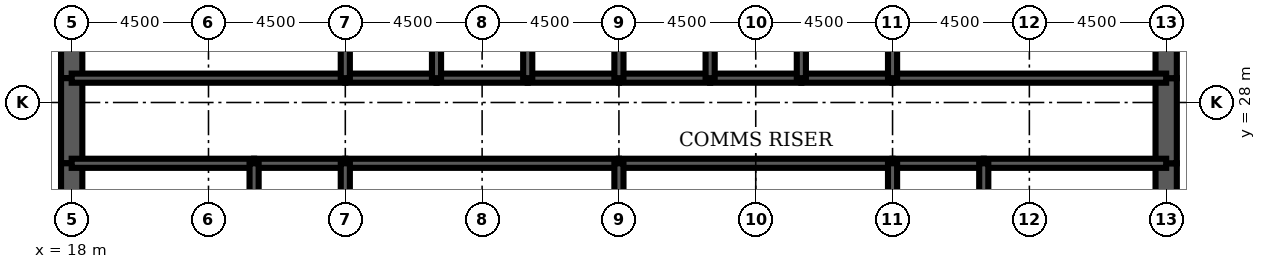
"""IFC4 building model, lengths in metres.
Left out: names, types, materials, properties, quantities, classifications, styles, units other than length and angle.
Written with IfcOpenShell. Run it as: python <this file> out.ifc"""

import sys

from ifc_helpers import new_model, si_unit, direction, frame, frame_2d, origin, place, context, subcontext, project, spatial, rectangle, extrude, element, fill, save


model = new_model("IFC4")
c1 = context("Model", 3, precision=1e-05, world=origin(), true_north=direction((0.0, 1.0)))
c2 = subcontext(c1, "Body", "Model", "MODEL_VIEW")
j1 = project(units=[si_unit("LENGTHUNIT", "METRE"), si_unit("PLANEANGLEUNIT", "RADIAN")], contexts=[c1])
p1 = place(None, origin())
s1 = spatial("IfcSite", under=j1, at=p1, CompositionType="ELEMENT")
p2 = place(p1, origin())
s2 = spatial("IfcBuilding", under=s1, at=p2, CompositionType="ELEMENT")
p3 = place(p2, frame((0.0, 0.0, 292.1)))
s3 = spatial("IfcBuildingStorey", under=s2, at=p3, CompositionType="ELEMENT", Elevation=292.1)
p4 = place(p3, frame((18.0, 32.0, 0.0), z_axis=(0.0, 0.0, 1.0), x_axis=(0.0, -1.0, 0.0)))
e1 = element("IfcWall", 1, at=p4, inside=s3, PredefinedType="SHEAR", context=c2, shape_type="SweptSolid", body=[
    extrude(rectangle(XDim=3.2, YDim=0.7, at=frame_2d((1.6, 0.0))), origin(), (0.0, 0.0, 1.0), 4.2),
])
p5 = place(p3, frame((18.0, 28.8, 0.0), z_axis=(0.0, 0.0, 1.0), x_axis=(0.0, -1.0, 0.0)))
e2 = element("IfcWall", 2, at=p5, inside=s3, PredefinedType="SHEAR", context=c2, shape_type="SweptSolid", body=[
    extrude(rectangle(XDim=2.8, YDim=0.7, at=frame_2d((1.4, 0.0))), origin(), (0.0, 0.0, 1.0), 4.2),
])
p6 = place(p5, frame((0.4, 0.0, 0.0)))
e3 = element("IfcOpeningElement", 3, at=p6, cuts=e2, PredefinedType="OPENING", context=c2, shape_type="SweptSolid", body=[
    extrude(rectangle(XDim=1.8, YDim=2.1, at=frame_2d((0.9, 1.05))), frame((0.0, 0.36, 0.0), z_axis=(0.0, -1.0, 0.0), x_axis=(1.0, 0.0, 0.0)), (0.0, 0.0, 1.0), 0.72),
])
for number, where, z_axis, x_axis in (
    (4, (18.0, 26.0, 0.0), (0.0, 0.0, 1.0), (0.0, -1.0, 0.0)),
    (5, (54.0, 22.0, 0.0), (0.0, 0.0, 1.0), (0.0, 1.0, 0.0)),
):
    element("IfcWall", number, at=place(p3, frame(where, z_axis=z_axis, x_axis=x_axis)), inside=s3, PredefinedType="SHEAR", context=c2, shape_type="SweptSolid", body=[
        extrude(rectangle(XDim=4.0, YDim=0.7, at=frame_2d((2.0, 0.0))), origin(), (0.0, 0.0, 1.0), 4.2),
    ])
p7 = place(p3, frame((54.0, 26.0, 0.0), z_axis=(0.0, 0.0, 1.0), x_axis=(0.0, 1.0, 0.0)))
e6 = element("IfcWall", 6, at=p7, inside=s3, PredefinedType="SHEAR", context=c2, shape_type="SweptSolid", body=[
    extrude(rectangle(XDim=2.8, YDim=0.7, at=frame_2d((1.4, 0.0))), origin(), (0.0, 0.0, 1.0), 4.2),
])
p8 = place(p7, frame((0.6, 0.0, 0.0)))
e7 = element("IfcOpeningElement", 7, at=p8, cuts=e6, PredefinedType="OPENING", context=c2, shape_type="SweptSolid", body=[
    extrude(rectangle(XDim=1.8, YDim=2.1, at=frame_2d((0.9, 1.05))), frame((0.0, 0.36, 0.0), z_axis=(0.0, -1.0, 0.0), x_axis=(1.0, 0.0, 0.0)), (0.0, 0.0, 1.0), 0.72),
])
p9 = place(p3, frame((54.0, 28.8, 0.0), z_axis=(0.0, 0.0, 1.0), x_axis=(0.0, 1.0, 0.0)))
e8 = element("IfcWall", 8, at=p9, inside=s3, PredefinedType="SHEAR", context=c2, shape_type="SweptSolid", body=[
    extrude(rectangle(XDim=3.2, YDim=0.7, at=frame_2d((1.6, 0.0))), origin(), (0.0, 0.0, 1.0), 4.2),
])
p10 = place(p3, frame((18.0, 28.8, 0.0), z_axis=(0.0, 0.0, 1.0), x_axis=(1.0, 0.0, 0.0)))
e9 = element("IfcWall", 9, at=p10, inside=s3, PredefinedType="SOLIDWALL", context=c2, shape_type="SweptSolid", body=[
    extrude(rectangle(XDim=9.0, YDim=0.3, at=frame_2d((4.5, 0.0))), origin(), (0.0, 0.0, 1.0), 4.2),
])
p11 = place(p10, frame((0.65, 0.0, 0.0)))
e10 = element("IfcOpeningElement", 10, at=p11, cuts=e9, PredefinedType="OPENING", context=c2, shape_type="SweptSolid", body=[
    extrude(rectangle(XDim=1.0, YDim=2.1, at=frame_2d((0.5, 1.05))), frame((0.0, 0.16, 0.0), z_axis=(0.0, -1.0, 0.0), x_axis=(1.0, 0.0, 0.0)), (0.0, 0.0, 1.0), 0.32),
])
p12 = place(p3, frame((27.0, 28.8, 0.0), z_axis=(0.0, 0.0, 1.0), x_axis=(1.0, 0.0, 0.0)))
e11 = element("IfcWall", 11, at=p12, inside=s3, PredefinedType="SOLIDWALL", context=c2, shape_type="SweptSolid", body=[
    extrude(rectangle(XDim=3.0, YDim=0.3, at=frame_2d((1.5, 0.0))), origin(), (0.0, 0.0, 1.0), 4.2),
])
p13 = place(p12, frame((0.95, 0.0, 0.0)))
e12 = element("IfcOpeningElement", 12, at=p13, cuts=e11, PredefinedType="OPENING", context=c2, shape_type="SweptSolid", body=[
    extrude(rectangle(XDim=1.1, YDim=2.2, at=frame_2d((0.55, 1.1))), frame((0.0, 0.16, 0.0), z_axis=(0.0, -1.0, 0.0), x_axis=(1.0, 0.0, 0.0)), (0.0, 0.0, 1.0), 0.32),
])
p14 = place(p3, frame((30.0, 28.8, 0.0), z_axis=(0.0, 0.0, 1.0), x_axis=(1.0, 0.0, 0.0)))
e13 = element("IfcWall", 13, at=p14, inside=s3, PredefinedType="SOLIDWALL", context=c2, shape_type="SweptSolid", body=[
    extrude(rectangle(XDim=3.0, YDim=0.3, at=frame_2d((1.5, 0.0))), origin(), (0.0, 0.0, 1.0), 4.2),
])
p15 = place(p14, frame((0.95, 0.0, 0.0)))
e14 = element("IfcOpeningElement", 14, at=p15, cuts=e13, PredefinedType="OPENING", context=c2, shape_type="SweptSolid", body=[
    extrude(rectangle(XDim=1.1, YDim=2.2, at=frame_2d((0.55, 1.1))), frame((0.0, 0.16, 0.0), z_axis=(0.0, -1.0, 0.0), x_axis=(1.0, 0.0, 0.0)), (0.0, 0.0, 1.0), 0.32),
])
p16 = place(p3, frame((33.0, 28.8, 0.0), z_axis=(0.0, 0.0, 1.0), x_axis=(1.0, 0.0, 0.0)))
e15 = element("IfcWall", 15, at=p16, inside=s3, PredefinedType="SOLIDWALL", context=c2, shape_type="SweptSolid", body=[
    extrude(rectangle(XDim=3.0, YDim=0.3, at=frame_2d((1.5, 0.0))), origin(), (0.0, 0.0, 1.0), 4.2),
])
p17 = place(p16, frame((0.95, 0.0, 0.0)))
e16 = element("IfcOpeningElement", 16, at=p17, cuts=e15, PredefinedType="OPENING", context=c2, shape_type="SweptSolid", body=[
    extrude(rectangle(XDim=1.1, YDim=2.2, at=frame_2d((0.55, 1.1))), frame((0.0, 0.16, 0.0), z_axis=(0.0, -1.0, 0.0), x_axis=(1.0, 0.0, 0.0)), (0.0, 0.0, 1.0), 0.32),
])
p18 = place(p3, frame((36.0, 28.8, 0.0), z_axis=(0.0, 0.0, 1.0), x_axis=(1.0, 0.0, 0.0)))
e17 = element("IfcWall", 17, at=p18, inside=s3, PredefinedType="SOLIDWALL", context=c2, shape_type="SweptSolid", body=[
    extrude(rectangle(XDim=3.0, YDim=0.3, at=frame_2d((1.5, 0.0))), origin(), (0.0, 0.0, 1.0), 4.2),
])
p19 = place(p18, frame((1.0, 0.0, 0.0)))
e18 = element("IfcOpeningElement", 18, at=p19, cuts=e17, PredefinedType="OPENING", context=c2, shape_type="SweptSolid", body=[
    extrude(rectangle(XDim=1.0, YDim=2.1, at=frame_2d((0.5, 1.05))), frame((0.0, 0.16, 0.0), z_axis=(0.0, -1.0, 0.0), x_axis=(1.0, 0.0, 0.0)), (0.0, 0.0, 1.0), 0.32),
])
p20 = place(p3, frame((39.0, 28.8, 0.0), z_axis=(0.0, 0.0, 1.0), x_axis=(1.0, 0.0, 0.0)))
e19 = element("IfcWall", 19, at=p20, inside=s3, PredefinedType="SOLIDWALL", context=c2, shape_type="SweptSolid", body=[
    extrude(rectangle(XDim=3.0, YDim=0.3, at=frame_2d((1.5, 0.0))), origin(), (0.0, 0.0, 1.0), 4.2),
])
p21 = place(p20, frame((1.0, 0.0, 0.0)))
e20 = element("IfcOpeningElement", 20, at=p21, cuts=e19, PredefinedType="OPENING", context=c2, shape_type="SweptSolid", body=[
    extrude(rectangle(XDim=1.0, YDim=2.1, at=frame_2d((0.5, 1.05))), frame((0.0, 0.16, 0.0), z_axis=(0.0, -1.0, 0.0), x_axis=(1.0, 0.0, 0.0)), (0.0, 0.0, 1.0), 0.32),
])
p22 = place(p3, frame((42.0, 28.8, 0.0), z_axis=(0.0, 0.0, 1.0), x_axis=(1.0, 0.0, 0.0)))
e21 = element("IfcWall", 21, at=p22, inside=s3, PredefinedType="SOLIDWALL", context=c2, shape_type="SweptSolid", body=[
    extrude(rectangle(XDim=3.0, YDim=0.3, at=frame_2d((1.5, 0.0))), origin(), (0.0, 0.0, 1.0), 4.2),
])
p23 = place(p22, frame((0.95, 0.0, 0.0)))
e22 = element("IfcOpeningElement", 22, at=p23, cuts=e21, PredefinedType="OPENING", context=c2, shape_type="SweptSolid", body=[
    extrude(rectangle(XDim=1.1, YDim=2.2, at=frame_2d((0.55, 1.1))), frame((0.0, 0.16, 0.0), z_axis=(0.0, -1.0, 0.0), x_axis=(1.0, 0.0, 0.0)), (0.0, 0.0, 1.0), 0.32),
])
p24 = place(p3, frame((45.0, 28.8, 0.0), z_axis=(0.0, 0.0, 1.0), x_axis=(1.0, 0.0, 0.0)))
e23 = element("IfcWall", 23, at=p24, inside=s3, PredefinedType="SOLIDWALL", context=c2, shape_type="SweptSolid", body=[
    extrude(rectangle(XDim=9.0, YDim=0.3, at=frame_2d((4.5, 0.0))), origin(), (0.0, 0.0, 1.0), 4.2),
])
p25 = place(p24, frame((7.35, 0.0, 0.0)))
e24 = element("IfcOpeningElement", 24, at=p25, cuts=e23, PredefinedType="OPENING", context=c2, shape_type="SweptSolid", body=[
    extrude(rectangle(XDim=1.0, YDim=2.1, at=frame_2d((0.5, 1.05))), frame((0.0, 0.16, 0.0), z_axis=(0.0, -1.0, 0.0), x_axis=(1.0, 0.0, 0.0)), (0.0, 0.0, 1.0), 0.32),
])
p26 = place(p3, frame((18.0, 26.0, 0.0), z_axis=(0.0, 0.0, 1.0), x_axis=(1.0, 0.0, 0.0)))
e25 = element("IfcWall", 25, at=p26, inside=s3, PredefinedType="SOLIDWALL", context=c2, shape_type="SweptSolid", body=[
    extrude(rectangle(XDim=6.0, YDim=0.3, at=frame_2d((3.0, 0.0))), origin(), (0.0, 0.0, 1.0), 4.2),
])
p27 = place(p3, frame((24.0, 26.0, 0.0), z_axis=(0.0, 0.0, 1.0), x_axis=(1.0, 0.0, 0.0)))
e26 = element("IfcWall", 26, at=p27, inside=s3, PredefinedType="SOLIDWALL", context=c2, shape_type="SweptSolid", body=[
    extrude(rectangle(XDim=3.0, YDim=0.3, at=frame_2d((1.5, 0.0))), origin(), (0.0, 0.0, 1.0), 4.2),
])
for number, where, z_axis, x_axis in (
    (27, (27.0, 26.0, 0.0), (0.0, 0.0, 1.0), (1.0, 0.0, 0.0)),
    (28, (36.0, 26.0, 0.0), (0.0, 0.0, 1.0), (1.0, 0.0, 0.0)),
):
    element("IfcWall", number, at=place(p3, frame(where, z_axis=z_axis, x_axis=x_axis)), inside=s3, PredefinedType="SOLIDWALL", context=c2, shape_type="SweptSolid", body=[
        extrude(rectangle(XDim=9.0, YDim=0.3, at=frame_2d((4.5, 0.0))), origin(), (0.0, 0.0, 1.0), 4.2),
    ])
p28 = place(p3, frame((45.0, 26.0, 0.0), z_axis=(0.0, 0.0, 1.0), x_axis=(1.0, 0.0, 0.0)))
e29 = element("IfcWall", 29, at=p28, inside=s3, PredefinedType="SOLIDWALL", context=c2, shape_type="SweptSolid", body=[
    extrude(rectangle(XDim=3.0, YDim=0.3, at=frame_2d((1.5, 0.0))), origin(), (0.0, 0.0, 1.0), 4.2),
])
p29 = place(p3, frame((48.0, 26.0, 0.0), z_axis=(0.0, 0.0, 1.0), x_axis=(1.0, 0.0, 0.0)))
e30 = element("IfcWall", 30, at=p29, inside=s3, PredefinedType="SOLIDWALL", context=c2, shape_type="SweptSolid", body=[
    extrude(rectangle(XDim=6.0, YDim=0.3, at=frame_2d((3.0, 0.0))), origin(), (0.0, 0.0, 1.0), 4.2),
])
for number, where, z_axis, x_axis in (
    (31, (27.0, 28.8, 0.0), (0.0, 0.0, 1.0), (0.0, 1.0, 0.0)),
    (32, (30.0, 28.8, 0.0), (0.0, 0.0, 1.0), (0.0, 1.0, 0.0)),
    (33, (33.0, 28.8, 0.0), (0.0, 0.0, 1.0), (0.0, 1.0, 0.0)),
    (34, (36.0, 28.8, 0.0), (0.0, 0.0, 1.0), (0.0, 1.0, 0.0)),
    (35, (39.0, 28.8, 0.0), (0.0, 0.0, 1.0), (0.0, 1.0, 0.0)),
    (36, (42.0, 28.8, 0.0), (0.0, 0.0, 1.0), (0.0, 1.0, 0.0)),
    (37, (45.0, 28.8, 0.0), (0.0, 0.0, 1.0), (0.0, 1.0, 0.0)),
):
    element("IfcWall", number, at=place(p3, frame(where, z_axis=z_axis, x_axis=x_axis)), inside=s3, PredefinedType="SOLIDWALL", context=c2, shape_type="SweptSolid", body=[
        extrude(rectangle(XDim=3.2, YDim=0.3, at=frame_2d((1.6, 0.0))), origin(), (0.0, 0.0, 1.0), 4.2),
    ])
for number, where, z_axis, x_axis in (
    (38, (24.0, 22.0, 0.0), (0.0, 0.0, 1.0), (0.0, 1.0, 0.0)),
    (39, (27.0, 22.0, 0.0), (0.0, 0.0, 1.0), (0.0, 1.0, 0.0)),
    (40, (36.0, 22.0, 0.0), (0.0, 0.0, 1.0), (0.0, 1.0, 0.0)),
    (41, (45.0, 22.0, 0.0), (0.0, 0.0, 1.0), (0.0, 1.0, 0.0)),
    (42, (48.0, 22.0, 0.0), (0.0, 0.0, 1.0), (0.0, 1.0, 0.0)),
):
    element("IfcWall", number, at=place(p3, frame(where, z_axis=z_axis, x_axis=x_axis)), inside=s3, PredefinedType="SOLIDWALL", context=c2, shape_type="SweptSolid", body=[
        extrude(rectangle(XDim=4.0, YDim=0.3, at=frame_2d((2.0, 0.0))), origin(), (0.0, 0.0, 1.0), 4.2),
    ])
p30 = place(p3, frame((39.0, 22.15, 0.0), z_axis=(0.0, 0.0, 1.0), x_axis=(0.0, 1.0, 0.0)))
e43 = element("IfcWall", 43, at=p30, inside=s3, PredefinedType="PARTITIONING", context=c2, shape_type="SweptSolid", body=[
    extrude(rectangle(XDim=3.7, YDim=0.15, at=frame_2d((1.85, 0.0))), origin(), (0.0, 0.0, 1.0), 3.0),
])
p31 = place(p30, frame((2.2, 0.0, 0.0)))
e44 = element("IfcOpeningElement", 44, at=p31, cuts=e43, PredefinedType="OPENING", context=c2, shape_type="SweptSolid", body=[
    extrude(rectangle(XDim=1.0, YDim=2.1, at=frame_2d((0.5, 1.05))), frame((0.0, 0.085, 0.0), z_axis=(0.0, -1.0, 0.0), x_axis=(1.0, 0.0, 0.0)), (0.0, 0.0, 1.0), 0.17),
])
p32 = place(p3, frame((51.775, 22.15, 0.0), z_axis=(0.0, 0.0, 1.0), x_axis=(0.0, 1.0, 0.0)))
e45 = element("IfcWall", 45, at=p32, inside=s3, PredefinedType="PARTITIONING", context=c2, shape_type="SweptSolid", body=[
    extrude(rectangle(XDim=3.7, YDim=0.15, at=frame_2d((1.85, 0.0))), origin(), (0.0, 0.0, 1.0), 3.0),
])
p33 = place(p31, origin())
e46 = element("IfcDoor", 46, at=p33, inside=s3, OperationType="SINGLE_SWING_RIGHT", PredefinedType="DOOR", context=c2, shape_type="SweptSolid", body=[
    extrude(rectangle(XDim=1.0, YDim=2.1, at=frame_2d((0.5, 1.05))), frame((0.0, 0.025, 0.0), z_axis=(0.0, -1.0, 0.0), x_axis=(1.0, 0.0, 0.0)), (0.0, 0.0, 1.0), 0.05),
])
fill(e44, e46)
p34 = place(p23, origin())
e47 = element("IfcDoor", 47, at=p34, inside=s3, OperationType="DOUBLE_DOOR_SLIDING", PredefinedType="USERDEFINED", context=c2, shape_type="SweptSolid", body=[
    extrude(rectangle(XDim=1.1, YDim=2.2, at=frame_2d((0.55, 1.1))), frame((0.0, 0.025, 0.0), z_axis=(0.0, -1.0, 0.0), x_axis=(1.0, 0.0, 0.0)), (0.0, 0.0, 1.0), 0.05),
])
fill(e22, e47)
p35 = place(p13, origin())
e48 = element("IfcDoor", 48, at=p35, inside=s3, OperationType="DOUBLE_DOOR_SLIDING", PredefinedType="USERDEFINED", context=c2, shape_type="SweptSolid", body=[
    extrude(rectangle(XDim=1.1, YDim=2.2, at=frame_2d((0.55, 1.1))), frame((0.0, 0.025, 0.0), z_axis=(0.0, -1.0, 0.0), x_axis=(1.0, 0.0, 0.0)), (0.0, 0.0, 1.0), 0.05),
])
fill(e12, e48)
p36 = place(p15, origin())
e49 = element("IfcDoor", 49, at=p36, inside=s3, OperationType="DOUBLE_DOOR_SLIDING", PredefinedType="USERDEFINED", context=c2, shape_type="SweptSolid", body=[
    extrude(rectangle(XDim=1.1, YDim=2.2, at=frame_2d((0.55, 1.1))), frame((0.0, 0.025, 0.0), z_axis=(0.0, -1.0, 0.0), x_axis=(1.0, 0.0, 0.0)), (0.0, 0.0, 1.0), 0.05),
])
fill(e14, e49)
p37 = place(p17, origin())
e50 = element("IfcDoor", 50, at=p37, inside=s3, OperationType="DOUBLE_DOOR_SLIDING", PredefinedType="USERDEFINED", context=c2, shape_type="SweptSolid", body=[
    extrude(rectangle(XDim=1.1, YDim=2.2, at=frame_2d((0.55, 1.1))), frame((0.0, 0.025, 0.0), z_axis=(0.0, -1.0, 0.0), x_axis=(1.0, 0.0, 0.0)), (0.0, 0.0, 1.0), 0.05),
])
fill(e16, e50)
p38 = place(p11, origin())
e51 = element("IfcDoor", 51, at=p38, inside=s3, OperationType="SINGLE_SWING_LEFT", PredefinedType="DOOR", context=c2, shape_type="SweptSolid", body=[
    extrude(rectangle(XDim=1.0, YDim=2.1, at=frame_2d((0.5, 1.05))), frame((0.0, 0.025, 0.0), z_axis=(0.0, -1.0, 0.0), x_axis=(1.0, 0.0, 0.0)), (0.0, 0.0, 1.0), 0.05),
])
fill(e10, e51)
p39 = place(p25, origin())
e52 = element("IfcDoor", 52, at=p39, inside=s3, OperationType="SINGLE_SWING_RIGHT", PredefinedType="DOOR", context=c2, shape_type="SweptSolid", body=[
    extrude(rectangle(XDim=1.0, YDim=2.1, at=frame_2d((0.5, 1.05))), frame((0.0, 0.025, 0.0), z_axis=(0.0, -1.0, 0.0), x_axis=(1.0, 0.0, 0.0)), (0.0, 0.0, 1.0), 0.05),
])
fill(e24, e52)
p40 = place(p6, origin())
e53 = element("IfcDoor", 53, at=p40, inside=s3, OperationType="SINGLE_SWING_LEFT", PredefinedType="DOOR", context=c2, shape_type="SweptSolid", body=[
    extrude(rectangle(XDim=1.8, YDim=2.1, at=frame_2d((0.9, 1.05))), frame((0.0, 0.35, 0.0), z_axis=(0.0, -1.0, 0.0), x_axis=(1.0, 0.0, 0.0)), (0.0, 0.0, 1.0), 0.699),
])
fill(e3, e53)
p41 = place(p8, origin())
e54 = element("IfcDoor", 54, at=p41, inside=s3, OperationType="SINGLE_SWING_LEFT", PredefinedType="DOOR", context=c2, shape_type="SweptSolid", body=[
    extrude(rectangle(XDim=1.8, YDim=2.1, at=frame_2d((0.9, 1.05))), frame((0.0, 0.35, 0.0), z_axis=(0.0, -1.0, 0.0), x_axis=(1.0, 0.0, 0.0)), (0.0, 0.0, 1.0), 0.699),
])
fill(e7, e54)
p42 = place(p19, origin())
e55 = element("IfcDoor", 55, at=p42, inside=s3, OperationType="SINGLE_SWING_LEFT", PredefinedType="DOOR", context=c2, shape_type="SweptSolid", body=[
    extrude(rectangle(XDim=1.0, YDim=2.1, at=frame_2d((0.5, 1.05))), frame((0.0, 0.025, 0.0), z_axis=(0.0, -1.0, 0.0), x_axis=(1.0, 0.0, 0.0)), (0.0, 0.0, 1.0), 0.05),
])
fill(e18, e55)
p43 = place(p21, origin())
e56 = element("IfcDoor", 56, at=p43, inside=s3, OperationType="SINGLE_SWING_LEFT", PredefinedType="DOOR", context=c2, shape_type="SweptSolid", body=[
    extrude(rectangle(XDim=1.0, YDim=2.1, at=frame_2d((0.5, 1.05))), frame((0.0, 0.025, 0.0), z_axis=(0.0, -1.0, 0.0), x_axis=(1.0, 0.0, 0.0)), (0.0, 0.0, 1.0), 0.05),
])
fill(e20, e56)
save(model, sys.argv[1])
